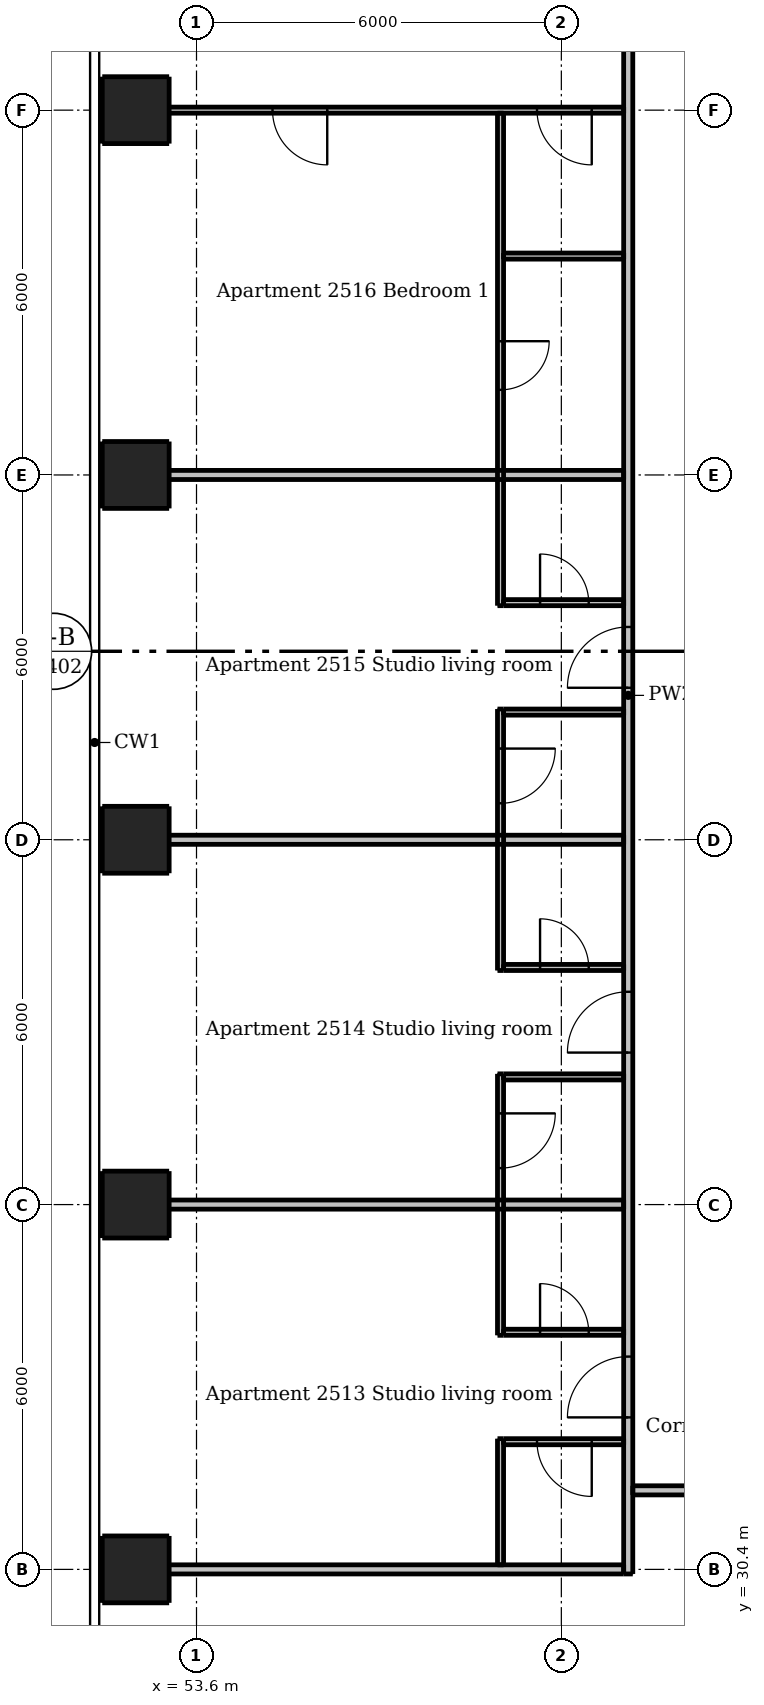
"""IFC4 building model, lengths in metres.
Left out: names, types, materials, properties, quantities, classifications, styles, units other than length and angle.
Written with IfcOpenShell. Run it as: python <this file> out.ifc"""

import sys

from ifc_helpers import new_model, si_unit, direction, frame, frame_2d, origin, origin_2d, place, context, subcontext, project, spatial, rectangle, extrude, element, fill, save


model = new_model("IFC4")
c1 = context("Model", 3, precision=1e-05, world=origin(), true_north=direction((0.0, 1.0)))
c2 = subcontext(c1, "Body", "Model", "MODEL_VIEW")
j1 = project(units=[si_unit("LENGTHUNIT", "METRE"), si_unit("PLANEANGLEUNIT", "RADIAN")], contexts=[c1])
p1 = place(None, origin())
s1 = spatial("IfcSite", under=j1, at=p1, CompositionType="ELEMENT")
p2 = place(p1, origin())
s2 = spatial("IfcBuilding", under=s1, at=p2, CompositionType="ELEMENT")
p3 = place(p2, frame((0.0, 0.0, 95.2)))
s3 = spatial("IfcBuildingStorey", under=s2, at=p3, CompositionType="ELEMENT", Elevation=95.2)
for number, where, z_axis, x_axis in (
    (1, (52.6, 30.4, 0.0), (0.0, 0.0, 1.0), (1.0, 0.0, 0.0)),
    (2, (52.6, 36.4, 0.0), (0.0, 0.0, 1.0), (1.0, 0.0, 0.0)),
    (3, (52.6, 42.4, 0.0), (0.0, 0.0, 1.0), (1.0, 0.0, 0.0)),
    (4, (52.6, 48.4, 0.0), (0.0, 0.0, 1.0), (1.0, 0.0, 0.0)),
    (5, (52.6, 54.4, 0.0), (0.0, 0.0, 1.0), (1.0, 0.0, 0.0)),
):
    element("IfcColumn", number, at=place(p3, frame(where, z_axis=z_axis, x_axis=x_axis)), inside=s3, PredefinedType="COLUMN", context=c2, shape_type="SweptSolid", body=[
        extrude(rectangle(XDim=1.1, YDim=1.1, at=origin_2d()), origin(), (0.0, 0.0, 1.0), 3.05),
    ])
p4 = place(p3, frame((58.6, 30.475, 0.0), z_axis=(0.0, 0.0, 1.0), x_axis=(0.0, 1.0, 0.0)))
e6 = element("IfcWall", 6, at=p4, inside=s3, PredefinedType="PARTITIONING", context=c2, shape_type="SweptSolid", body=[
    extrude(rectangle(XDim=2.075, YDim=0.1, at=frame_2d((1.038, 0.0))), origin(), (0.0, 0.0, 1.0), 3.05),
])
p5 = place(p3, frame((58.6, 38.55, 0.0), z_axis=(0.0, 0.0, 1.0), x_axis=(0.0, -1.0, 0.0)))
e7 = element("IfcWall", 7, at=p5, inside=s3, PredefinedType="PARTITIONING", context=c2, shape_type="SweptSolid", body=[
    extrude(rectangle(XDim=4.3, YDim=0.1, at=frame_2d((2.15, 0.0))), origin(), (0.0, 0.0, 1.0), 3.05),
])
p6 = place(p5, frame((0.65, 0.0, 0.0)))
e8 = element("IfcOpeningElement", 8, at=p6, cuts=e7, PredefinedType="OPENING", context=c2, shape_type="SweptSolid", body=[
    extrude(rectangle(XDim=0.9, YDim=2.1, at=frame_2d((0.45, 1.05))), frame((0.0, 0.06, 0.0), z_axis=(0.0, -1.0, 0.0), x_axis=(1.0, 0.0, 0.0)), (0.0, 0.0, 1.0), 0.12),
])
p7 = place(p3, frame((58.6, 44.55, 0.0), z_axis=(0.0, 0.0, 1.0), x_axis=(0.0, -1.0, 0.0)))
e9 = element("IfcWall", 9, at=p7, inside=s3, PredefinedType="PARTITIONING", context=c2, shape_type="SweptSolid", body=[
    extrude(rectangle(XDim=4.3, YDim=0.1, at=frame_2d((2.15, 0.0))), origin(), (0.0, 0.0, 1.0), 3.05),
])
p8 = place(p7, frame((0.65, 0.0, 0.0)))
e10 = element("IfcOpeningElement", 10, at=p8, cuts=e9, PredefinedType="OPENING", context=c2, shape_type="SweptSolid", body=[
    extrude(rectangle(XDim=0.9, YDim=2.1, at=frame_2d((0.45, 1.05))), frame((0.0, 0.06, 0.0), z_axis=(0.0, -1.0, 0.0), x_axis=(1.0, 0.0, 0.0)), (0.0, 0.0, 1.0), 0.12),
])
p9 = place(p3, frame((58.6, 54.35, 0.0), z_axis=(0.0, 0.0, 1.0), x_axis=(0.0, -1.0, 0.0)))
e11 = element("IfcWall", 11, at=p9, inside=s3, PredefinedType="PARTITIONING", context=c2, shape_type="SweptSolid", body=[
    extrude(rectangle(XDim=8.1, YDim=0.1, at=frame_2d((4.05, 0.0))), origin(), (0.0, 0.0, 1.0), 3.05),
])
p10 = place(p9, frame((3.75, 0.0, 0.0)))
e12 = element("IfcOpeningElement", 12, at=p10, cuts=e11, PredefinedType="OPENING", context=c2, shape_type="SweptSolid", body=[
    extrude(rectangle(XDim=0.8, YDim=2.1, at=frame_2d((0.4, 1.05))), frame((0.0, 0.06, 0.0), z_axis=(0.0, -1.0, 0.0), x_axis=(1.0, 0.0, 0.0)), (0.0, 0.0, 1.0), 0.12),
])
p11 = place(p3, frame((60.625, 54.4, 0.0), z_axis=(0.0, 0.0, 1.0), x_axis=(-1.0, 0.0, 0.0)))
e13 = element("IfcWall", 13, at=p11, inside=s3, PredefinedType="PARTITIONING", context=c2, shape_type="SweptSolid", body=[
    extrude(rectangle(XDim=8.625, YDim=0.1, at=frame_2d((4.312, 0.0))), origin(), (0.0, 0.0, 1.0), 2.516),
])
p12 = place(p11, frame((0.525, 0.0, 0.0)))
e14 = element("IfcOpeningElement", 14, at=p12, cuts=e13, PredefinedType="OPENING", context=c2, shape_type="SweptSolid", body=[
    extrude(rectangle(XDim=0.9, YDim=2.1, at=frame_2d((0.45, 1.05))), frame((0.0, 0.06, 0.0), z_axis=(0.0, -1.0, 0.0), x_axis=(1.0, 0.0, 0.0)), (0.0, 0.0, 1.0), 0.12),
])
p13 = place(p11, frame((4.875, 0.0, 0.0)))
e15 = element("IfcOpeningElement", 15, at=p13, cuts=e13, PredefinedType="OPENING", context=c2, shape_type="SweptSolid", body=[
    extrude(rectangle(XDim=0.9, YDim=2.1, at=frame_2d((0.45, 1.05))), frame((0.0, 0.06, 0.0), z_axis=(0.0, -1.0, 0.0), x_axis=(1.0, 0.0, 0.0)), (0.0, 0.0, 1.0), 0.12),
])
p14 = place(p3, frame((58.65, 52.0, 0.0), z_axis=(0.0, 0.0, 1.0), x_axis=(1.0, 0.0, 0.0)))
e16 = element("IfcWall", 16, at=p14, inside=s3, PredefinedType="PARTITIONING", context=c2, shape_type="SweptSolid", body=[
    extrude(rectangle(XDim=1.975, YDim=0.1, at=frame_2d((0.988, 0.0))), origin(), (0.0, 0.0, 1.0), 3.05),
])
p15 = place(p3, frame((58.65, 46.3, 0.0), z_axis=(0.0, 0.0, 1.0), x_axis=(1.0, 0.0, 0.0)))
e17 = element("IfcWall", 17, at=p15, inside=s3, PredefinedType="PARTITIONING", context=c2, shape_type="SweptSolid", body=[
    extrude(rectangle(XDim=1.975, YDim=0.1, at=frame_2d((0.988, 0.0))), origin(), (0.0, 0.0, 1.0), 3.05),
])
p16 = place(p15, frame((0.6, 0.0, 0.0)))
e18 = element("IfcOpeningElement", 18, at=p16, cuts=e17, PredefinedType="OPENING", context=c2, shape_type="SweptSolid", body=[
    extrude(rectangle(XDim=0.8, YDim=2.1, at=frame_2d((0.4, 1.05))), frame((0.0, 0.06, 0.0), z_axis=(0.0, -1.0, 0.0), x_axis=(1.0, 0.0, 0.0)), (0.0, 0.0, 1.0), 0.12),
])
p17 = place(p3, frame((58.65, 44.5, 0.0), z_axis=(0.0, 0.0, 1.0), x_axis=(1.0, 0.0, 0.0)))
e19 = element("IfcWall", 19, at=p17, inside=s3, PredefinedType="PARTITIONING", context=c2, shape_type="SweptSolid", body=[
    extrude(rectangle(XDim=1.975, YDim=0.1, at=frame_2d((0.988, 0.0))), origin(), (0.0, 0.0, 1.0), 3.05),
])
p18 = place(p3, frame((58.65, 40.3, 0.0), z_axis=(0.0, 0.0, 1.0), x_axis=(1.0, 0.0, 0.0)))
e20 = element("IfcWall", 20, at=p18, inside=s3, PredefinedType="PARTITIONING", context=c2, shape_type="SweptSolid", body=[
    extrude(rectangle(XDim=1.975, YDim=0.1, at=frame_2d((0.988, 0.0))), origin(), (0.0, 0.0, 1.0), 3.05),
])
p19 = place(p18, frame((0.6, 0.0, 0.0)))
e21 = element("IfcOpeningElement", 21, at=p19, cuts=e20, PredefinedType="OPENING", context=c2, shape_type="SweptSolid", body=[
    extrude(rectangle(XDim=0.8, YDim=2.1, at=frame_2d((0.4, 1.05))), frame((0.0, 0.06, 0.0), z_axis=(0.0, -1.0, 0.0), x_axis=(1.0, 0.0, 0.0)), (0.0, 0.0, 1.0), 0.12),
])
p20 = place(p3, frame((58.65, 38.5, 0.0), z_axis=(0.0, 0.0, 1.0), x_axis=(1.0, 0.0, 0.0)))
e22 = element("IfcWall", 22, at=p20, inside=s3, PredefinedType="PARTITIONING", context=c2, shape_type="SweptSolid", body=[
    extrude(rectangle(XDim=1.975, YDim=0.1, at=frame_2d((0.988, 0.0))), origin(), (0.0, 0.0, 1.0), 3.05),
])
p21 = place(p3, frame((58.65, 34.3, 0.0), z_axis=(0.0, 0.0, 1.0), x_axis=(1.0, 0.0, 0.0)))
e23 = element("IfcWall", 23, at=p21, inside=s3, PredefinedType="PARTITIONING", context=c2, shape_type="SweptSolid", body=[
    extrude(rectangle(XDim=1.975, YDim=0.1, at=frame_2d((0.988, 0.0))), origin(), (0.0, 0.0, 1.0), 3.05),
])
p22 = place(p21, frame((0.6, 0.0, 0.0)))
e24 = element("IfcOpeningElement", 24, at=p22, cuts=e23, PredefinedType="OPENING", context=c2, shape_type="SweptSolid", body=[
    extrude(rectangle(XDim=0.8, YDim=2.1, at=frame_2d((0.4, 1.05))), frame((0.0, 0.06, 0.0), z_axis=(0.0, -1.0, 0.0), x_axis=(1.0, 0.0, 0.0)), (0.0, 0.0, 1.0), 0.12),
])
p23 = place(p3, frame((60.625, 32.5, 0.0), z_axis=(0.0, 0.0, 1.0), x_axis=(-1.0, 0.0, 0.0)))
e25 = element("IfcWall", 25, at=p23, inside=s3, PredefinedType="PARTITIONING", context=c2, shape_type="SweptSolid", body=[
    extrude(rectangle(XDim=1.975, YDim=0.1, at=frame_2d((0.988, 0.0))), origin(), (0.0, 0.0, 1.0), 3.05),
])
p24 = place(p23, frame((0.525, 0.0, 0.0)))
e26 = element("IfcOpeningElement", 26, at=p24, cuts=e25, PredefinedType="OPENING", context=c2, shape_type="SweptSolid", body=[
    extrude(rectangle(XDim=0.9, YDim=2.1, at=frame_2d((0.45, 1.05))), frame((0.0, 0.06, 0.0), z_axis=(0.0, -1.0, 0.0), x_axis=(1.0, 0.0, 0.0)), (0.0, 0.0, 1.0), 0.12),
])
p25 = place(p3, frame((60.7, 30.325, 0.0), z_axis=(0.0, 0.0, 1.0), x_axis=(0.0, 1.0, 0.0)))
e27 = element("IfcWall", 27, at=p25, inside=s3, PredefinedType="PARTITIONING", context=c2, shape_type="SweptSolid", body=[
    extrude(rectangle(XDim=28.9, YDim=0.15, at=frame_2d((14.45, 0.0))), origin(), (0.0, 0.0, 1.0), 3.05),
])
p26 = place(p25, frame((2.575, 0.0, 0.0)))
e28 = element("IfcOpeningElement", 28, at=p26, cuts=e27, PredefinedType="OPENING", context=c2, shape_type="SweptSolid", body=[
    extrude(rectangle(XDim=1.0, YDim=2.1, at=frame_2d((0.5, 1.05))), frame((0.0, 0.085, 0.0), z_axis=(0.0, -1.0, 0.0), x_axis=(1.0, 0.0, 0.0)), (0.0, 0.0, 1.0), 0.17),
])
p27 = place(p25, frame((8.575, 0.0, 0.0)))
e29 = element("IfcOpeningElement", 29, at=p27, cuts=e27, PredefinedType="OPENING", context=c2, shape_type="SweptSolid", body=[
    extrude(rectangle(XDim=1.0, YDim=2.1, at=frame_2d((0.5, 1.05))), frame((0.0, 0.085, 0.0), z_axis=(0.0, -1.0, 0.0), x_axis=(1.0, 0.0, 0.0)), (0.0, 0.0, 1.0), 0.17),
])
p28 = place(p25, frame((14.575, 0.0, 0.0)))
e30 = element("IfcOpeningElement", 30, at=p28, cuts=e27, PredefinedType="OPENING", context=c2, shape_type="SweptSolid", body=[
    extrude(rectangle(XDim=1.0, YDim=2.1, at=frame_2d((0.5, 1.05))), frame((0.0, 0.085, 0.0), z_axis=(0.0, -1.0, 0.0), x_axis=(1.0, 0.0, 0.0)), (0.0, 0.0, 1.0), 0.17),
])
p29 = place(p25, frame((26.025, 0.0, 0.0)))
e31 = element("IfcOpeningElement", 31, at=p29, cuts=e27, PredefinedType="OPENING", context=c2, shape_type="SweptSolid", body=[
    extrude(rectangle(XDim=1.0, YDim=2.1, at=frame_2d((0.5, 1.05))), frame((0.0, 0.085, 0.0), z_axis=(0.0, -1.0, 0.0), x_axis=(1.0, 0.0, 0.0)), (0.0, 0.0, 1.0), 0.17),
])
for number, where, z_axis, x_axis in (
    (32, (52.0, 48.4, 0.0), (0.0, 0.0, 1.0), (1.0, 0.0, 0.0)),
    (33, (52.0, 42.4, 0.0), (0.0, 0.0, 1.0), (1.0, 0.0, 0.0)),
    (34, (52.0, 36.4, 0.0), (0.0, 0.0, 1.0), (1.0, 0.0, 0.0)),
):
    element("IfcWall", number, at=place(p3, frame(where, z_axis=z_axis, x_axis=x_axis)), inside=s3, PredefinedType="PARTITIONING", context=c2, shape_type="SweptSolid", body=[
        extrude(rectangle(XDim=8.625, YDim=0.15, at=frame_2d((4.312, 0.0))), origin(), (0.0, 0.0, 1.0), 2.516),
    ])
p30 = place(p3, frame((89.525, 31.7, 0.0), z_axis=(0.0, 0.0, 1.0), x_axis=(-1.0, 0.0, 0.0)))
e35 = element("IfcWall", 35, at=p30, inside=s3, PredefinedType="PARTITIONING", context=c2, shape_type="SweptSolid", body=[
    extrude(rectangle(XDim=28.75, YDim=0.15, at=frame_2d((14.375, 0.0))), origin(), (0.0, 0.0, 1.0), 3.05),
])
p31 = place(p30, frame((25.875, 0.0, 0.0)))
e36 = element("IfcOpeningElement", 36, at=p31, cuts=e35, PredefinedType="OPENING", context=c2, shape_type="SweptSolid", body=[
    extrude(rectangle(XDim=1.0, YDim=2.1, at=frame_2d((0.5, 1.05))), frame((0.0, 0.085, 0.0), z_axis=(0.0, -1.0, 0.0), x_axis=(1.0, 0.0, 0.0)), (0.0, 0.0, 1.0), 0.17),
])
p32 = place(p30, frame((14.425, 0.0, 0.0)))
e37 = element("IfcOpeningElement", 37, at=p32, cuts=e35, PredefinedType="OPENING", context=c2, shape_type="SweptSolid", body=[
    extrude(rectangle(XDim=1.0, YDim=2.1, at=frame_2d((0.5, 1.05))), frame((0.0, 0.085, 0.0), z_axis=(0.0, -1.0, 0.0), x_axis=(1.0, 0.0, 0.0)), (0.0, 0.0, 1.0), 0.17),
])
p33 = place(p30, frame((8.425, 0.0, 0.0)))
e38 = element("IfcOpeningElement", 38, at=p33, cuts=e35, PredefinedType="OPENING", context=c2, shape_type="SweptSolid", body=[
    extrude(rectangle(XDim=1.0, YDim=2.1, at=frame_2d((0.5, 1.05))), frame((0.0, 0.085, 0.0), z_axis=(0.0, -1.0, 0.0), x_axis=(1.0, 0.0, 0.0)), (0.0, 0.0, 1.0), 0.17),
])
p34 = place(p30, frame((2.425, 0.0, 0.0)))
e39 = element("IfcOpeningElement", 39, at=p34, cuts=e35, PredefinedType="OPENING", context=c2, shape_type="SweptSolid", body=[
    extrude(rectangle(XDim=1.0, YDim=2.1, at=frame_2d((0.5, 1.05))), frame((0.0, 0.085, 0.0), z_axis=(0.0, -1.0, 0.0), x_axis=(1.0, 0.0, 0.0)), (0.0, 0.0, 1.0), 0.17),
])
p35 = place(p3, frame((52.0, 30.4, 0.0), z_axis=(0.0, 0.0, 1.0), x_axis=(1.0, 0.0, 0.0)))
e40 = element("IfcWall", 40, at=p35, inside=s3, PredefinedType="PARTITIONING", context=c2, shape_type="SweptSolid", body=[
    extrude(rectangle(XDim=8.625, YDim=0.15, at=frame_2d((4.312, 0.0))), origin(), (0.0, 0.0, 1.0), 2.647),
])
p36 = place(p26, origin())
e41 = element("IfcDoor", 41, at=p36, inside=s3, OperationType="SINGLE_SWING_LEFT", PredefinedType="DOOR", context=c2, shape_type="SweptSolid", body=[
    extrude(rectangle(XDim=1.0, YDim=2.1, at=frame_2d((0.5, 1.05))), frame((0.0, 0.025, 0.0), z_axis=(0.0, -1.0, 0.0), x_axis=(1.0, 0.0, 0.0)), (0.0, 0.0, 1.0), 0.05),
])
fill(e28, e41)
p37 = place(p24, origin())
e42 = element("IfcDoor", 42, at=p37, inside=s3, OperationType="SINGLE_SWING_LEFT", PredefinedType="DOOR", context=c2, shape_type="SweptSolid", body=[
    extrude(rectangle(XDim=0.9, YDim=2.1, at=frame_2d((0.45, 1.05))), frame((0.0, 0.025, 0.0), z_axis=(0.0, -1.0, 0.0), x_axis=(1.0, 0.0, 0.0)), (0.0, 0.0, 1.0), 0.05),
])
fill(e26, e42)
p38 = place(p22, origin())
e43 = element("IfcDoor", 43, at=p38, inside=s3, OperationType="SINGLE_SWING_LEFT", PredefinedType="DOOR", context=c2, shape_type="SweptSolid", body=[
    extrude(rectangle(XDim=0.8, YDim=2.1, at=frame_2d((0.4, 1.05))), frame((0.0, 0.025, 0.0), z_axis=(0.0, -1.0, 0.0), x_axis=(1.0, 0.0, 0.0)), (0.0, 0.0, 1.0), 0.05),
])
fill(e24, e43)
p39 = place(p27, origin())
e44 = element("IfcDoor", 44, at=p39, inside=s3, OperationType="SINGLE_SWING_LEFT", PredefinedType="DOOR", context=c2, shape_type="SweptSolid", body=[
    extrude(rectangle(XDim=1.0, YDim=2.1, at=frame_2d((0.5, 1.05))), frame((0.0, 0.025, 0.0), z_axis=(0.0, -1.0, 0.0), x_axis=(1.0, 0.0, 0.0)), (0.0, 0.0, 1.0), 0.05),
])
fill(e29, e44)
p40 = place(p6, origin())
e45 = element("IfcDoor", 45, at=p40, inside=s3, OperationType="SINGLE_SWING_LEFT", PredefinedType="DOOR", context=c2, shape_type="SweptSolid", body=[
    extrude(rectangle(XDim=0.9, YDim=2.1, at=frame_2d((0.45, 1.05))), frame((0.0, 0.025, 0.0), z_axis=(0.0, -1.0, 0.0), x_axis=(1.0, 0.0, 0.0)), (0.0, 0.0, 1.0), 0.05),
])
fill(e8, e45)
p41 = place(p19, origin())
e46 = element("IfcDoor", 46, at=p41, inside=s3, OperationType="SINGLE_SWING_LEFT", PredefinedType="DOOR", context=c2, shape_type="SweptSolid", body=[
    extrude(rectangle(XDim=0.8, YDim=2.1, at=frame_2d((0.4, 1.05))), frame((0.0, 0.025, 0.0), z_axis=(0.0, -1.0, 0.0), x_axis=(1.0, 0.0, 0.0)), (0.0, 0.0, 1.0), 0.05),
])
fill(e21, e46)
p42 = place(p28, origin())
e47 = element("IfcDoor", 47, at=p42, inside=s3, OperationType="SINGLE_SWING_LEFT", PredefinedType="DOOR", context=c2, shape_type="SweptSolid", body=[
    extrude(rectangle(XDim=1.0, YDim=2.1, at=frame_2d((0.5, 1.05))), frame((0.0, 0.025, 0.0), z_axis=(0.0, -1.0, 0.0), x_axis=(1.0, 0.0, 0.0)), (0.0, 0.0, 1.0), 0.05),
])
fill(e30, e47)
p43 = place(p8, origin())
e48 = element("IfcDoor", 48, at=p43, inside=s3, OperationType="SINGLE_SWING_LEFT", PredefinedType="DOOR", context=c2, shape_type="SweptSolid", body=[
    extrude(rectangle(XDim=0.9, YDim=2.1, at=frame_2d((0.45, 1.05))), frame((0.0, 0.025, 0.0), z_axis=(0.0, -1.0, 0.0), x_axis=(1.0, 0.0, 0.0)), (0.0, 0.0, 1.0), 0.05),
])
fill(e10, e48)
p44 = place(p16, origin())
e49 = element("IfcDoor", 49, at=p44, inside=s3, OperationType="SINGLE_SWING_LEFT", PredefinedType="DOOR", context=c2, shape_type="SweptSolid", body=[
    extrude(rectangle(XDim=0.8, YDim=2.1, at=frame_2d((0.4, 1.05))), frame((0.0, 0.025, 0.0), z_axis=(0.0, -1.0, 0.0), x_axis=(1.0, 0.0, 0.0)), (0.0, 0.0, 1.0), 0.05),
])
fill(e18, e49)
p45 = place(p12, origin())
e50 = element("IfcDoor", 50, at=p45, inside=s3, OperationType="SINGLE_SWING_LEFT", PredefinedType="DOOR", context=c2, shape_type="SweptSolid", body=[
    extrude(rectangle(XDim=0.9, YDim=2.1, at=frame_2d((0.45, 1.05))), frame((0.0, 0.025, 0.0), z_axis=(0.0, -1.0, 0.0), x_axis=(1.0, 0.0, 0.0)), (0.0, 0.0, 1.0), 0.05),
])
fill(e14, e50)
p46 = place(p13, origin())
e51 = element("IfcDoor", 51, at=p46, inside=s3, OperationType="SINGLE_SWING_LEFT", PredefinedType="DOOR", context=c2, shape_type="SweptSolid", body=[
    extrude(rectangle(XDim=0.9, YDim=2.1, at=frame_2d((0.45, 1.05))), frame((0.0, 0.025, 0.0), z_axis=(0.0, -1.0, 0.0), x_axis=(1.0, 0.0, 0.0)), (0.0, 0.0, 1.0), 0.05),
])
fill(e15, e51)
p47 = place(p10, origin())
e52 = element("IfcDoor", 52, at=p47, inside=s3, OperationType="SINGLE_SWING_LEFT", PredefinedType="DOOR", context=c2, shape_type="SweptSolid", body=[
    extrude(rectangle(XDim=0.8, YDim=2.1, at=frame_2d((0.4, 1.05))), frame((0.0, 0.025, 0.0), z_axis=(0.0, -1.0, 0.0), x_axis=(1.0, 0.0, 0.0)), (0.0, 0.0, 1.0), 0.05),
])
fill(e12, e52)
save(model, sys.argv[1])
